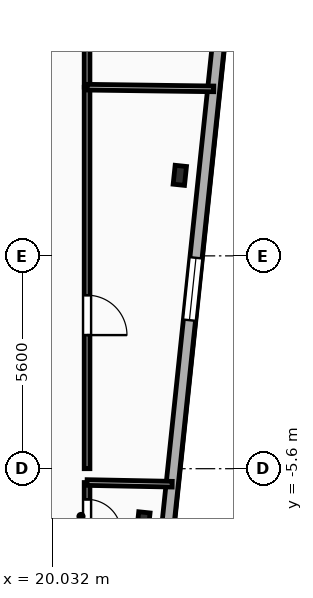
"""IFC4 building model, lengths in metres.
Left out: names, types, materials, properties, quantities, classifications, styles, units other than length and angle.
Written with IfcOpenShell. Run it as: python <this file> out.ifc"""

import sys

from ifc_helpers import new_model, si_unit, direction, frame, frame_2d, origin, origin_2d, place, context, subcontext, project, spatial, rectangle, i_section, extrude, element, fill, save


model = new_model("IFC4")
c1 = context("Model", 3, precision=1e-05, world=origin(), true_north=direction((0.0, 1.0)))
c2 = subcontext(c1, "Body", "Model", "MODEL_VIEW")
j1 = project(units=[si_unit("LENGTHUNIT", "METRE"), si_unit("PLANEANGLEUNIT", "RADIAN")], contexts=[c1])
p1 = place(None, origin())
s1 = spatial("IfcSite", under=j1, at=p1, CompositionType="ELEMENT")
p2 = place(p1, origin())
s2 = spatial("IfcBuilding", under=s1, at=p2, CompositionType="ELEMENT")
p3 = place(p2, frame((0.0, 0.0, 193.05)))
s3 = spatial("IfcBuildingStorey", under=s2, at=p3, CompositionType="ELEMENT", Elevation=193.05)
for number, where, z_axis, x_axis in (
    (1, (22.433, -6.998, 0.0), (0.0, 0.0, 1.0), (0.995, -0.105, 0.0)),
    (2, (23.391, 2.119, 0.0), (0.0, 0.0, 1.0), (0.995, -0.105, 0.0)),
):
    element("IfcColumn", number, at=place(p3, frame(where, z_axis=z_axis, x_axis=x_axis)), inside=s3, PredefinedType="COLUMN", context=c2, shape_type="SweptSolid", body=[
        extrude(i_section(OverallWidth=0.3, OverallDepth=0.5, WebThickness=0.014, FlangeThickness=0.028, FilletRadius=0.027, at=origin_2d()), origin(), (0.0, 0.0, 1.0), 3.35),
    ])
p4 = place(p3, frame((25.063, 11.814, 0.0), z_axis=(0.0, 0.0, 1.0), x_axis=(-0.104523275986, -0.99452244056, 0.0)))
e3 = element("IfcWall", 3, at=p4, inside=s3, PredefinedType="SOLIDWALL", context=c2, shape_type="SweptSolid", body=[
    extrude(rectangle(XDim=28.8, YDim=0.32, at=frame_2d((14.4, 0.0))), origin(), (0.0, 0.0, 1.0), 3.04),
])
p5 = place(p4, frame((3.186, 0.0, 0.85)))
e4 = element("IfcOpeningElement", 4, at=p5, cuts=e3, PredefinedType="OPENING", context=c2, shape_type="SweptSolid", body=[
    extrude(rectangle(XDim=1.65, YDim=1.85, at=frame_2d((0.825, 0.925))), frame((0.0, 0.17, 0.0), z_axis=(0.0, -1.0, 0.0), x_axis=(1.0, 0.0, 0.0)), (0.0, 0.0, 1.0), 0.34),
])
p6 = place(p4, frame((11.93, 0.0, 0.85)))
e5 = element("IfcOpeningElement", 5, at=p6, cuts=e3, PredefinedType="OPENING", context=c2, shape_type="SweptSolid", body=[
    extrude(rectangle(XDim=1.65, YDim=1.85, at=frame_2d((0.825, 0.925))), frame((0.0, 0.17, 0.0), z_axis=(0.0, -1.0, 0.0), x_axis=(1.0, 0.0, 0.0)), (0.0, 0.0, 1.0), 0.34),
])
p7 = place(p4, frame((22.359, 0.0, 0.85)))
e6 = element("IfcOpeningElement", 6, at=p7, cuts=e3, PredefinedType="OPENING", context=c2, shape_type="SweptSolid", body=[
    extrude(rectangle(XDim=1.65, YDim=1.85, at=frame_2d((0.825, 0.925))), frame((0.0, 0.17, 0.0), z_axis=(0.0, -1.0, 0.0), x_axis=(1.0, 0.0, 0.0)), (0.0, 0.0, 1.0), 0.34),
])
p8 = place(p3, frame((20.95, -5.964, 0.0), z_axis=(0.0, 0.0, 1.0), x_axis=(0.0, -1.0, 0.0)))
e7 = element("IfcWall", 7, at=p8, inside=s3, PredefinedType="PARTITIONING", context=c2, shape_type="SweptSolid", body=[
    extrude(rectangle(XDim=1.786, YDim=0.15, at=frame_2d((0.893, 0.0))), origin(), (0.0, 0.0, 1.0), 3.04),
])
p9 = place(p8, frame((0.443, 0.0, 0.0)))
e8 = element("IfcOpeningElement", 8, at=p9, cuts=e7, PredefinedType="OPENING", context=c2, shape_type="SweptSolid", body=[
    extrude(rectangle(XDim=0.9, YDim=2.1, at=frame_2d((0.45, 1.05))), frame((0.0, 0.085, 0.0), z_axis=(0.0, -1.0, 0.0), x_axis=(1.0, 0.0, 0.0)), (0.0, 0.0, 1.0), 0.17),
])
p10 = place(p3, frame((20.95, 4.438, 0.0), z_axis=(0.0, 0.0, 1.0), x_axis=(0.0, -1.0, 0.0)))
e9 = element("IfcWall", 9, at=p10, inside=s3, PredefinedType="PARTITIONING", context=c2, shape_type="SweptSolid", body=[
    extrude(rectangle(XDim=10.038, YDim=0.15, at=frame_2d((5.019, 0.0))), origin(), (0.0, 0.0, 1.0), 2.695),
])
p11 = place(p10, frame((5.472, 0.0, 0.0)))
e10 = element("IfcOpeningElement", 10, at=p11, cuts=e9, PredefinedType="OPENING", context=c2, shape_type="SweptSolid", body=[
    extrude(rectangle(XDim=1.05, YDim=2.15, at=frame_2d((0.525, 1.075))), frame((0.0, 0.085, 0.0), z_axis=(0.0, -1.0, 0.0), x_axis=(1.0, 0.0, 0.0)), (0.0, 0.0, 1.0), 0.17),
])
p12 = place(p3, frame((20.95, 8.5, 0.0), z_axis=(0.0, 0.0, 1.0), x_axis=(0.0, -1.0, 0.0)))
e11 = element("IfcWall", 11, at=p12, inside=s3, PredefinedType="PARTITIONING", context=c2, shape_type="SweptSolid", body=[
    extrude(rectangle(XDim=4.062, YDim=0.15, at=frame_2d((2.031, 0.0))), origin(), (0.0, 0.0, 1.0), 3.04),
])
p13 = place(p12, frame((0.812, 0.0, 0.0)))
e12 = element("IfcOpeningElement", 12, at=p13, cuts=e11, PredefinedType="OPENING", context=c2, shape_type="SweptSolid", body=[
    extrude(rectangle(XDim=1.05, YDim=2.15, at=frame_2d((0.525, 1.075))), frame((0.0, 0.085, 0.0), z_axis=(0.0, -1.0, 0.0), x_axis=(1.0, 0.0, 0.0)), (0.0, 0.0, 1.0), 0.17),
])
p14 = place(p3, frame((20.95, -5.964, 0.0), z_axis=(0.0, 0.0, 1.0), x_axis=(0.999809784752, -0.019503700029, 0.0)))
e13 = element("IfcWall", 13, at=p14, inside=s3, PredefinedType="PARTITIONING", context=c2, shape_type="SweptSolid", body=[
    extrude(rectangle(XDim=2.241, YDim=0.15, at=frame_2d((1.12, 0.0))), origin(), (0.0, 0.0, 1.0), 3.04),
])
p15 = place(p3, frame((20.95, 4.438, 0.0), z_axis=(0.0, 0.0, 1.0), x_axis=(0.999913116238, -0.013181804667, 0.0)))
e14 = element("IfcWall", 14, at=p15, inside=s3, PredefinedType="PARTITIONING", context=c2, shape_type="SweptSolid", body=[
    extrude(rectangle(XDim=3.334, YDim=0.15, at=frame_2d((1.667, 0.0))), origin(), (0.0, 0.0, 1.0), 3.04),
])
p16 = place(p6, origin())
e15 = element("IfcWindow", 15, at=p16, inside=s3, PartitioningType="SINGLE_PANEL", PredefinedType="WINDOW", context=c2, shape_type="SweptSolid", body=[
    extrude(rectangle(XDim=1.65, YDim=1.85, at=frame_2d((0.825, 0.925))), frame((0.0, 0.03, 0.0), z_axis=(0.0, -1.0, 0.0), x_axis=(1.0, 0.0, 0.0)), (0.0, 0.0, 1.0), 0.06),
])
fill(e5, e15)
p17 = place(p9, origin())
e16 = element("IfcDoor", 16, at=p17, inside=s3, OperationType="SINGLE_SWING_RIGHT", PredefinedType="DOOR", context=c2, shape_type="SweptSolid", body=[
    extrude(rectangle(XDim=0.9, YDim=2.1, at=frame_2d((0.45, 1.05))), frame((0.0, 0.025, 0.0), z_axis=(0.0, -1.0, 0.0), x_axis=(1.0, 0.0, 0.0)), (0.0, 0.0, 1.0), 0.05),
])
fill(e8, e16)
p18 = place(p11, origin())
e17 = element("IfcDoor", 17, at=p18, inside=s3, OperationType="SINGLE_SWING_RIGHT", PredefinedType="DOOR", context=c2, shape_type="SweptSolid", body=[
    extrude(rectangle(XDim=1.05, YDim=2.15, at=frame_2d((0.525, 1.075))), frame((0.0, 0.025, 0.0), z_axis=(0.0, -1.0, 0.0), x_axis=(1.0, 0.0, 0.0)), (0.0, 0.0, 1.0), 0.05),
])
fill(e10, e17)
save(model, sys.argv[1])
